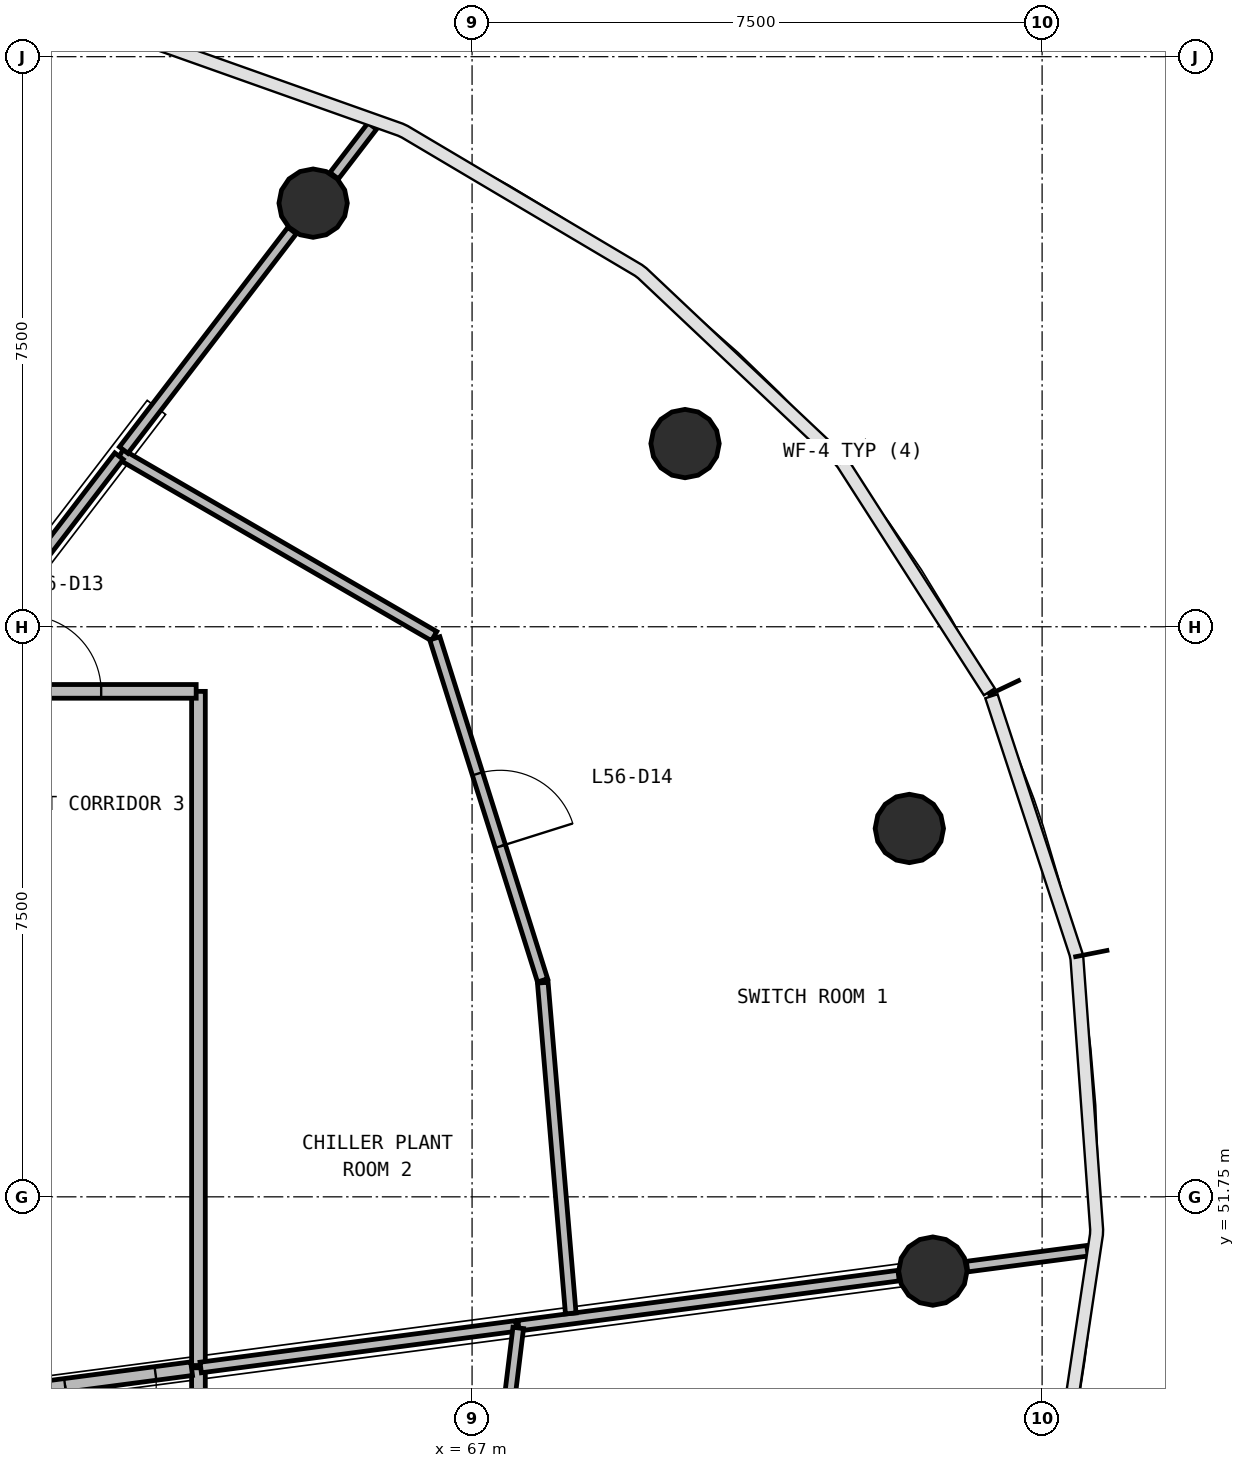
"""IFC4 building model, lengths in metres.
Left out: names, types, materials, properties, quantities, classifications, styles, units other than length and angle.
Written with IfcOpenShell. Run it as: python <this file> out.ifc"""

import sys

from ifc_helpers import new_model, si_unit, direction, frame, frame_2d, origin, origin_2d, place, context, subcontext, project, spatial, rectangle, circle, extrude, source, transform, mapped, element, fill, save


model = new_model("IFC4")
c1 = context("Model", 3, precision=1e-05, world=origin(), true_north=direction((0.0, 1.0)))
c2 = subcontext(c1, "Body", "Model", "MODEL_VIEW")
j1 = project(units=[si_unit("LENGTHUNIT", "METRE"), si_unit("PLANEANGLEUNIT", "RADIAN")], contexts=[c1])
p1 = place(None, origin())
s1 = spatial("IfcSite", under=j1, at=p1, CompositionType="ELEMENT")
p2 = place(p1, origin())
s2 = spatial("IfcBuilding", under=s1, at=p2, CompositionType="ELEMENT")
p3 = place(p2, frame((0.0, 0.0, 230.6)))
s3 = spatial("IfcBuildingStorey", under=s2, at=p3, CompositionType="ELEMENT", Elevation=230.6)
m1 = source(origin(), c2, "Body", "SweptSolid", [
    extrude(circle(Radius=0.45, at=origin_2d()), origin(), (0.0, 0.0, 1.0), 3.58),
])
for number, where, z_axis, x_axis in (
    (1, (73.062, 50.773, 0.0), (0.0, 0.0, 1.0), (1.0, 0.0, 0.0)),
    (2, (72.753, 56.596, 0.0), (0.0, 0.0, 1.0), (1.0, 0.0, 0.0)),
    (3, (69.802, 61.66, 0.0), (0.0, 0.0, 1.0), (1.0, 0.0, 0.0)),
    (4, (64.909, 64.823, 0.0), (0.0, 0.0, 1.0), (1.0, 0.0, 0.0)),
):
    element("IfcColumn", number, at=place(p3, frame(where, z_axis=z_axis, x_axis=x_axis)), inside=s3, PredefinedType="COLUMN", context=c2, shape_type="MappedRepresentation", body=[
        mapped(m1, transform((0.0, 0.0, 0.0), scale=1.0)),
    ])
p4 = place(p3, frame((63.4, 49.501, 0.0), z_axis=(0.0, 0.0, 1.0), x_axis=(0.0, -1.0, 0.0)))
e5 = element("IfcWall", 5, at=p4, inside=s3, PredefinedType="PARTITIONING", context=c2, shape_type="SweptSolid", body=[
    extrude(rectangle(XDim=10.248, YDim=0.18, at=frame_2d((5.124, 0.0))), origin(), (0.0, 0.0, 1.0), 2.38),
])
p5 = place(p4, frame((4.598, 0.0, 0.0)))
e6 = element("IfcOpeningElement", 6, at=p5, cuts=e5, PredefinedType="OPENING", context=c2, shape_type="SweptSolid", body=[
    extrude(rectangle(XDim=1.0, YDim=2.1, at=frame_2d((0.5, 1.05))), frame((0.0, 0.1, 0.0), z_axis=(0.0, -1.0, 0.0), x_axis=(1.0, 0.0, 0.0)), (0.0, 0.0, 1.0), 0.2),
])
p6 = place(p3, frame((63.4, 49.531, 0.0), z_axis=(0.0, 0.0, 1.0), x_axis=(0.0, 1.0, 0.0)))
e7 = element("IfcWall", 7, at=p6, inside=s3, PredefinedType="PARTITIONING", context=c2, shape_type="SweptSolid", body=[
    extrude(rectangle(XDim=8.869, YDim=0.18, at=frame_2d((4.435, 0.0))), origin(), (0.0, 0.0, 1.0), 2.38),
])
p7 = place(p3, frame((60.01, 58.4, 0.0), z_axis=(0.0, 0.0, 1.0), x_axis=(1.0, 0.0, 0.0)))
e8 = element("IfcWall", 8, at=p7, inside=s3, PredefinedType="PARTITIONING", context=c2, shape_type="SweptSolid", body=[
    extrude(rectangle(XDim=3.36, YDim=0.18, at=frame_2d((1.68, 0.0))), origin(), (0.0, 0.0, 1.0), 2.38),
])
p8 = place(p7, frame((1.11, 0.0, 0.0)))
e9 = element("IfcOpeningElement", 9, at=p8, cuts=e8, PredefinedType="OPENING", context=c2, shape_type="SweptSolid", body=[
    extrude(rectangle(XDim=1.0, YDim=2.1, at=frame_2d((0.5, 1.05))), frame((0.0, 0.1, 0.0), z_axis=(0.0, -1.0, 0.0), x_axis=(1.0, 0.0, 0.0)), (0.0, 0.0, 1.0), 0.2),
])
p9 = place(p3, frame((63.31, 49.489, 0.0), z_axis=(0.0, 0.0, 1.0), x_axis=(-0.991440737811, -0.130557509967, 0.0)))
e10 = element("IfcWall", 10, at=p9, inside=s3, PredefinedType="PARTITIONING", context=c2, shape_type="SweptSolid", body=[
    extrude(rectangle(XDim=2.33, YDim=0.18, at=frame_2d((1.165, 0.0))), origin(), (0.0, 0.0, 1.0), 2.38),
])
p10 = place(p9, frame((0.48, 0.0, 0.0)))
e11 = element("IfcOpeningElement", 11, at=p10, cuts=e10, PredefinedType="OPENING", context=c2, shape_type="SweptSolid", body=[
    extrude(rectangle(XDim=1.2, YDim=2.1, at=frame_2d((0.6, 1.05))), frame((0.0, 0.1, 0.0), z_axis=(0.0, -1.0, 0.0), x_axis=(1.0, 0.0, 0.0)), (0.0, 0.0, 1.0), 0.2),
])
p11 = place(p3, frame((67.611, 50.055, 0.0), z_axis=(0.0, 0.0, 1.0), x_axis=(0.991443419201, 0.130537146143, 0.0)))
e12 = element("IfcWall", 12, at=p11, inside=s3, PredefinedType="PARTITIONING", context=c2, shape_type="SweptSolid", body=[
    extrude(rectangle(XDim=5.044, YDim=0.14, at=frame_2d((2.522, 0.0))), origin(), (0.0, 0.0, 1.0), 2.38),
])
p12 = place(p3, frame((63.43, 49.505, 0.0), z_axis=(0.0, 0.0, 1.0), x_axis=(0.991450524652, 0.130483168137, 0.0)))
e13 = element("IfcWall", 13, at=p12, inside=s3, PredefinedType="PARTITIONING", context=c2, shape_type="SweptSolid", body=[
    extrude(rectangle(XDim=4.188, YDim=0.14, at=frame_2d((2.094, 0.0))), origin(), (0.0, 0.0, 1.0), 2.38),
])
p13 = place(p3, frame((66.5, 59.127, 0.0), z_axis=(0.0, 0.0, 1.0), x_axis=(-0.865241683045, 0.501354993914, 0.0)))
e14 = element("IfcWall", 14, at=p13, inside=s3, PredefinedType="PARTITIONING", context=c2, shape_type="SweptSolid", body=[
    extrude(rectangle(XDim=4.77, YDim=0.14, at=frame_2d((2.385, 0.0))), origin(), (0.0, 0.0, 1.0), 2.38),
])
p14 = place(p3, frame((66.51, 59.098, 0.0), z_axis=(0.0, 0.0, 1.0), x_axis=(0.300539528674, -0.953769359806, 0.0)))
e15 = element("IfcWall", 15, at=p14, inside=s3, PredefinedType="PARTITIONING", context=c2, shape_type="SweptSolid", body=[
    extrude(rectangle(XDim=4.719, YDim=0.14, at=frame_2d((2.359, 0.0))), origin(), (0.0, 0.0, 1.0), 2.38),
])
p15 = place(p14, frame((1.869, 0.0, 0.0)))
e16 = element("IfcOpeningElement", 16, at=p15, cuts=e15, PredefinedType="OPENING", context=c2, shape_type="SweptSolid", body=[
    extrude(rectangle(XDim=1.0, YDim=2.1, at=frame_2d((0.5, 1.05))), frame((0.0, 0.08, 0.0), z_axis=(0.0, -1.0, 0.0), x_axis=(1.0, 0.0, 0.0)), (0.0, 0.0, 1.0), 0.16),
])
p16 = place(p3, frame((68.298, 50.216, 0.0), z_axis=(0.0, 0.0, 1.0), x_axis=(-0.084308537488, 0.996439697376, 0.0)))
e17 = element("IfcWall", 17, at=p16, inside=s3, PredefinedType="PARTITIONING", context=c2, shape_type="SweptSolid", body=[
    extrude(rectangle(XDim=4.367, YDim=0.14, at=frame_2d((2.184, 0.0))), origin(), (0.0, 0.0, 1.0), 2.38),
])
p17 = place(p3, frame((67.115, 46.01, 0.0), z_axis=(0.0, 0.0, 1.0), x_axis=(0.121724415308, 0.992563935834, 0.0)))
e18 = element("IfcWall", 18, at=p17, inside=s3, PredefinedType="PARTITIONING", context=c2, shape_type="SweptSolid", body=[
    extrude(rectangle(XDim=4.045, YDim=0.14, at=frame_2d((2.023, 0.0))), origin(), (0.0, 0.0, 1.0), 2.38),
])
p18 = place(p3, frame((60.002, 58.429, 0.0), z_axis=(0.0, 0.0, 1.0), x_axis=(0.608748505227, 0.79336325689, 0.0)))
e19 = element("IfcWall", 19, at=p18, inside=s3, PredefinedType="PARTITIONING", context=c2, shape_type="SweptSolid", body=[
    extrude(rectangle(XDim=3.864, YDim=0.14, at=frame_2d((1.932, 0.0))), origin(), (0.0, 0.0, 1.0), 2.38),
])
p19 = place(p3, frame((62.416, 61.574, 0.0), z_axis=(0.0, 0.0, 1.0), x_axis=(0.608773631009, 0.793343977218, 0.0)))
e20 = element("IfcWall", 20, at=p19, inside=s3, PredefinedType="PARTITIONING", context=c2, shape_type="SweptSolid", body=[
    extrude(rectangle(XDim=3.64, YDim=0.14, at=frame_2d((1.82, 0.0))), origin(), (0.0, 0.0, 1.0), 2.38),
])
p20 = place(p3, frame((73.513, 50.832, 0.0), z_axis=(0.0, 0.0, 1.0), x_axis=(0.991448052913, 0.130501947779, 0.0)))
e21 = element("IfcWall", 21, at=p20, inside=s3, PredefinedType="PARTITIONING", context=c2, shape_type="SweptSolid", body=[
    extrude(rectangle(XDim=1.598, YDim=0.14, at=frame_2d((0.799, 0.0))), origin(), (0.0, 0.0, 1.0), 2.88),
])
p21 = place(p3, frame((65.186, 65.184, 0.0), z_axis=(0.0, 0.0, 1.0), x_axis=(0.608636710057, 0.793449024936, 0.0)))
e22 = element("IfcWall", 22, at=p21, inside=s3, PredefinedType="PARTITIONING", context=c2, shape_type="SweptSolid", body=[
    extrude(rectangle(XDim=0.824, YDim=0.14, at=frame_2d((0.412, 0.0))), origin(), (0.0, 0.0, 1.0), 2.88),
])
m2 = source(origin(), c2, "Body", "SweptSolid", [
    extrude(rectangle(XDim=1.0, YDim=2.1, at=frame_2d((0.5, 1.05))), frame((0.0, 0.025, 0.0), z_axis=(0.0, -1.0, 0.0), x_axis=(1.0, 0.0, 0.0)), (0.0, 0.0, 1.0), 0.05),
])
p22 = place(p8, origin())
e23 = element("IfcDoor", 23, at=p22, inside=s3, OperationType="SINGLE_SWING_LEFT", PredefinedType="DOOR", context=c2, shape_type="MappedRepresentation", body=[
    mapped(m2, transform((0.0, 0.0, 0.0), scale=1.0)),
])
fill(e9, e23)
p23 = place(p15, origin())
e24 = element("IfcDoor", 24, at=p23, inside=s3, OperationType="SINGLE_SWING_RIGHT", PredefinedType="DOOR", context=c2, shape_type="MappedRepresentation", body=[
    mapped(m2, transform((0.0, 0.0, 0.0), scale=1.0)),
])
fill(e16, e24)
m3 = source(origin(), c2, "Body", "SweptSolid", [
    extrude(rectangle(XDim=1.2, YDim=2.1, at=frame_2d((0.6, 1.05))), frame((0.0, 0.025, 0.0), z_axis=(0.0, -1.0, 0.0), x_axis=(1.0, 0.0, 0.0)), (0.0, 0.0, 1.0), 0.05),
])
p24 = place(p10, origin())
e25 = element("IfcDoor", 25, at=p24, inside=s3, OperationType="SINGLE_SWING_RIGHT", PredefinedType="DOOR", context=c2, shape_type="MappedRepresentation", body=[
    mapped(m3, transform((0.0, 0.0, 0.0), scale=1.0)),
])
fill(e11, e25)
save(model, sys.argv[1])
